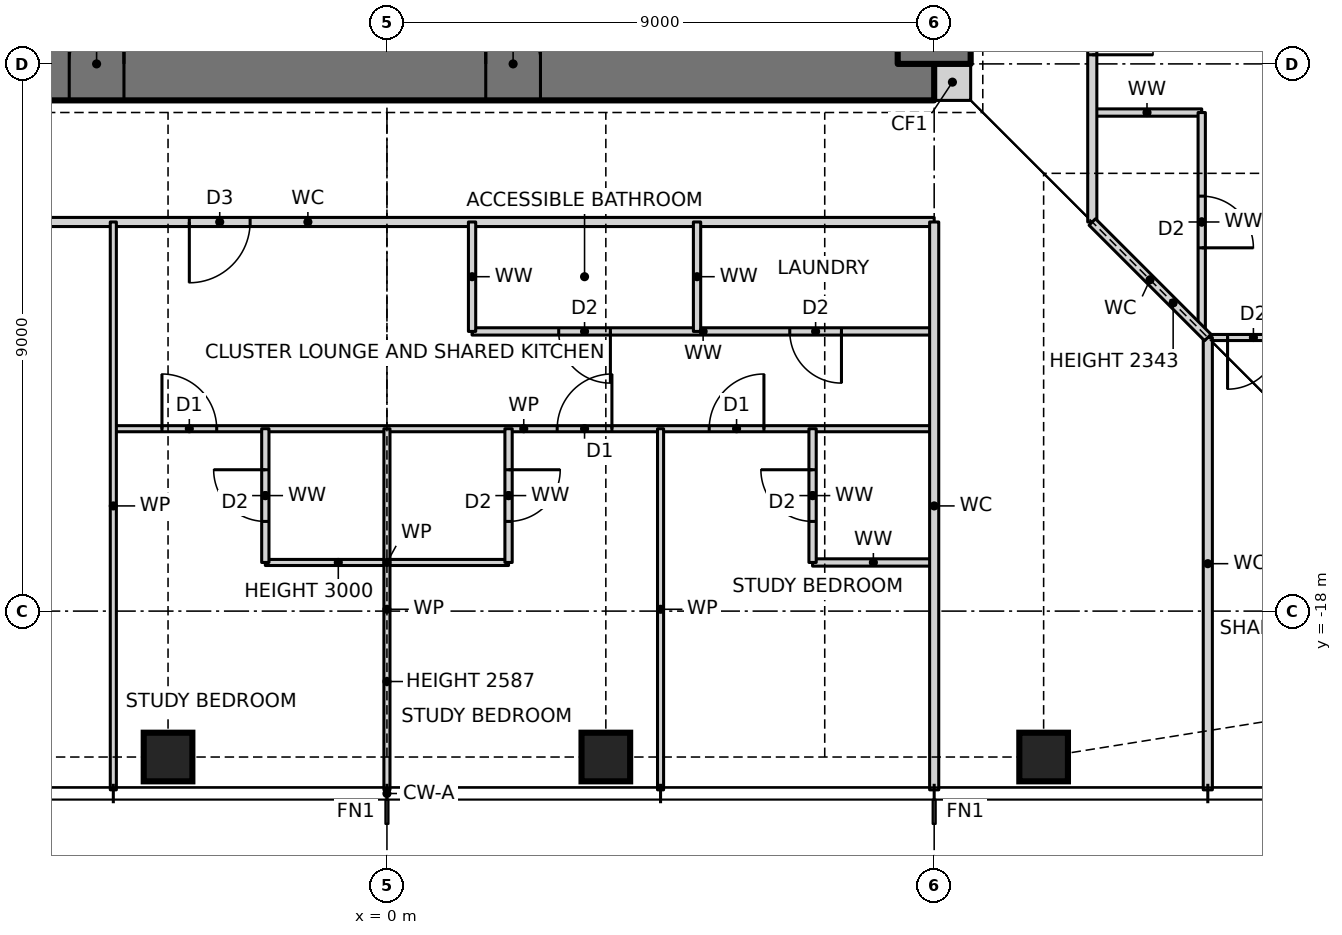
"""IFC4 building model, lengths in metres.
Left out: names, types, materials, properties, quantities, classifications, styles, units other than length and angle.
Written with IfcOpenShell. Run it as: python <this file> out.ifc"""

import sys

from ifc_helpers import new_model, si_unit, direction, frame, frame_2d, origin, origin_2d, place, context, subcontext, project, spatial, rectangle, hollow_rectangle, extrude, element, fill, save


model = new_model("IFC4")
c1 = context("Model", 3, precision=1e-05, world=origin(), true_north=direction((0.0, 1.0)))
c2 = subcontext(c1, "Body", "Model", "MODEL_VIEW")
j1 = project(units=[si_unit("LENGTHUNIT", "METRE"), si_unit("PLANEANGLEUNIT", "RADIAN")], contexts=[c1])
p1 = place(None, origin())
s1 = spatial("IfcSite", under=j1, at=p1, CompositionType="ELEMENT")
p2 = place(p1, origin())
s2 = spatial("IfcBuilding", under=s1, at=p2, CompositionType="ELEMENT")
p3 = place(p2, frame((0.0, 0.0, 136.5)))
s3 = spatial("IfcBuildingStorey", under=s2, at=p3, CompositionType="ELEMENT", Elevation=136.5)
for number, where, z_axis, x_axis in (
    (1, (-3.6, -20.4, 0.0), (0.0, 0.0, 1.0), (1.0, 0.0, 0.0)),
    (2, (3.6, -20.4, 0.0), (0.0, 0.0, 1.0), (1.0, 0.0, 0.0)),
    (3, (10.8, -20.4, 0.0), (0.0, 0.0, 1.0), (1.0, 0.0, 0.0)),
):
    element("IfcColumn", number, at=place(p3, frame(where, z_axis=z_axis, x_axis=x_axis)), inside=s3, PredefinedType="COLUMN", context=c2, shape_type="SweptSolid", body=[
        extrude(hollow_rectangle(XDim=0.8, YDim=0.8, WallThickness=0.07, at=origin_2d()), origin(), (0.0, 0.0, 1.0), 3.5),
    ])
p4 = place(p3, frame((9.0, -9.3, 0.0), z_axis=(0.0, 0.0, 1.0), x_axis=(1.0, 0.0, 0.0)))
e4 = element("IfcWall", 4, at=p4, inside=s3, PredefinedType="SOLIDWALL", context=c2, shape_type="SweptSolid", body=[
    extrude(rectangle(XDim=0.6, YDim=0.6, at=frame_2d((0.3, 0.0))), origin(), (0.0, 0.0, 1.0), 3.5),
])
p5 = place(p3, frame((-9.0, -9.0, 0.0), z_axis=(0.0, 0.0, 1.0), x_axis=(1.0, 0.0, 0.0)))
e5 = element("IfcWall", 5, at=p5, inside=s3, PredefinedType="SHEAR", context=c2, shape_type="SweptSolid", body=[
    extrude(rectangle(XDim=18.0, YDim=1.2, at=frame_2d((9.0, 0.0))), origin(), (0.0, 0.0, 1.0), 3.5),
])
p6 = place(p5, frame((3.775, 0.0, 0.0)))
e6 = element("IfcOpeningElement", 6, at=p6, cuts=e5, PredefinedType="OPENING", context=c2, shape_type="SweptSolid", body=[
    extrude(rectangle(XDim=0.9, YDim=2.1, at=frame_2d((0.45, 1.05))), frame((0.0, 0.61, 0.0), z_axis=(0.0, -1.0, 0.0), x_axis=(1.0, 0.0, 0.0)), (0.0, 0.0, 1.0), 1.22),
])
p7 = place(p5, frame((10.625, 0.0, 0.0)))
e7 = element("IfcOpeningElement", 7, at=p7, cuts=e5, PredefinedType="OPENING", context=c2, shape_type="SweptSolid", body=[
    extrude(rectangle(XDim=0.9, YDim=2.1, at=frame_2d((0.45, 1.05))), frame((0.0, 0.61, 0.0), z_axis=(0.0, -1.0, 0.0), x_axis=(1.0, 0.0, 0.0)), (0.0, 0.0, 1.0), 1.22),
])
p8 = place(p3, frame((9.0, -9.0, 0.0), z_axis=(0.0, 0.0, 1.0), x_axis=(0.0, 1.0, 0.0)))
e8 = element("IfcWall", 8, at=p8, inside=s3, PredefinedType="SHEAR", context=c2, shape_type="SweptSolid", body=[
    extrude(rectangle(XDim=18.0, YDim=1.2, at=frame_2d((9.0, 0.0))), origin(), (0.0, 0.0, 1.0), 3.5),
])
p9 = place(p8, frame((8.5, 0.0, 0.0)))
e9 = element("IfcOpeningElement", 9, at=p9, cuts=e8, PredefinedType="OPENING", context=c2, shape_type="SweptSolid", body=[
    extrude(rectangle(XDim=1.0, YDim=2.1, at=frame_2d((0.5, 1.05))), frame((0.0, 0.61, 0.0), z_axis=(0.0, -1.0, 0.0), x_axis=(1.0, 0.0, 0.0)), (0.0, 0.0, 1.0), 1.22),
])
p10 = place(p3, frame((-2.0, -17.2, 0.0), z_axis=(0.0, 0.0, 1.0), x_axis=(1.0, 0.0, 0.0)))
e10 = element("IfcWall", 10, at=p10, inside=s3, PredefinedType="PARTITIONING", context=c2, shape_type="SweptSolid", body=[
    extrude(rectangle(XDim=4.0, YDim=0.1, at=frame_2d((2.0, 0.0))), origin(), (0.0, 0.0, 1.0), 3.0),
])
p11 = place(p3, frame((7.0, -17.2, 0.0), z_axis=(0.0, 0.0, 1.0), x_axis=(1.0, 0.0, 0.0)))
e11 = element("IfcWall", 11, at=p11, inside=s3, PredefinedType="PARTITIONING", context=c2, shape_type="SweptSolid", body=[
    extrude(rectangle(XDim=2.0, YDim=0.12, at=frame_2d((1.0, 0.0))), origin(), (0.0, 0.0, 1.0), 3.27),
])
p12 = place(p3, frame((-4.5, -15.0, 0.0), z_axis=(0.0, 0.0, 1.0), x_axis=(1.0, 0.0, 0.0)))
e12 = element("IfcWall", 12, at=p12, inside=s3, PredefinedType="PARTITIONING", context=c2, shape_type="SweptSolid", body=[
    extrude(rectangle(XDim=13.5, YDim=0.1, at=frame_2d((6.75, 0.0))), origin(), (0.0, 0.0, 1.0), 3.27),
])
p13 = place(p12, frame((0.8, 0.0, 0.0)))
e13 = element("IfcOpeningElement", 13, at=p13, cuts=e12, PredefinedType="OPENING", context=c2, shape_type="SweptSolid", body=[
    extrude(rectangle(XDim=0.9, YDim=2.1, at=frame_2d((0.45, 1.05))), frame((0.0, 0.06, 0.0), z_axis=(0.0, -1.0, 0.0), x_axis=(1.0, 0.0, 0.0)), (0.0, 0.0, 1.0), 0.12),
])
p14 = place(p12, frame((7.3, 0.0, 0.0)))
e14 = element("IfcOpeningElement", 14, at=p14, cuts=e12, PredefinedType="OPENING", context=c2, shape_type="SweptSolid", body=[
    extrude(rectangle(XDim=0.9, YDim=2.1, at=frame_2d((0.45, 1.05))), frame((0.0, 0.06, 0.0), z_axis=(0.0, -1.0, 0.0), x_axis=(1.0, 0.0, 0.0)), (0.0, 0.0, 1.0), 0.12),
])
p15 = place(p12, frame((9.8, 0.0, 0.0)))
e15 = element("IfcOpeningElement", 15, at=p15, cuts=e12, PredefinedType="OPENING", context=c2, shape_type="SweptSolid", body=[
    extrude(rectangle(XDim=0.9, YDim=2.1, at=frame_2d((0.45, 1.05))), frame((0.0, 0.06, 0.0), z_axis=(0.0, -1.0, 0.0), x_axis=(1.0, 0.0, 0.0)), (0.0, 0.0, 1.0), 0.12),
])
p16 = place(p3, frame((13.5, -13.5, 0.0), z_axis=(0.0, 0.0, 1.0), x_axis=(1.0, 0.0, 0.0)))
e16 = element("IfcWall", 16, at=p16, inside=s3, PredefinedType="PARTITIONING", context=c2, shape_type="SweptSolid", body=[
    extrude(rectangle(XDim=7.44, YDim=0.1, at=frame_2d((3.72, 0.0))), origin(), (0.0, 0.0, 1.0), 3.27),
])
p17 = place(p16, frame((0.325, 0.0, 0.0)))
e17 = element("IfcOpeningElement", 17, at=p17, cuts=e16, PredefinedType="OPENING", context=c2, shape_type="SweptSolid", body=[
    extrude(rectangle(XDim=0.85, YDim=2.1, at=frame_2d((0.425, 1.05))), frame((0.0, 0.06, 0.0), z_axis=(0.0, -1.0, 0.0), x_axis=(1.0, 0.0, 0.0)), (0.0, 0.0, 1.0), 0.12),
])
p18 = place(p3, frame((1.4, -13.4, 0.0), z_axis=(0.0, 0.0, 1.0), x_axis=(1.0, 0.0, 0.0)))
e18 = element("IfcWall", 18, at=p18, inside=s3, PredefinedType="PARTITIONING", context=c2, shape_type="SweptSolid", body=[
    extrude(rectangle(XDim=7.6, YDim=0.12, at=frame_2d((3.8, 0.0))), origin(), (0.0, 0.0, 1.0), 3.27),
])
p19 = place(p18, frame((1.425, 0.0, 0.0)))
e19 = element("IfcOpeningElement", 19, at=p19, cuts=e18, PredefinedType="OPENING", context=c2, shape_type="SweptSolid", body=[
    extrude(rectangle(XDim=0.85, YDim=2.1, at=frame_2d((0.425, 1.05))), frame((0.0, 0.07, 0.0), z_axis=(0.0, -1.0, 0.0), x_axis=(1.0, 0.0, 0.0)), (0.0, 0.0, 1.0), 0.14),
])
p20 = place(p18, frame((5.225, 0.0, 0.0)))
e20 = element("IfcOpeningElement", 20, at=p20, cuts=e18, PredefinedType="OPENING", context=c2, shape_type="SweptSolid", body=[
    extrude(rectangle(XDim=0.85, YDim=2.1, at=frame_2d((0.425, 1.05))), frame((0.0, 0.07, 0.0), z_axis=(0.0, -1.0, 0.0), x_axis=(1.0, 0.0, 0.0)), (0.0, 0.0, 1.0), 0.14),
])
p21 = place(p3, frame((-11.6, -11.6, 0.0), z_axis=(0.0, 0.0, 1.0), x_axis=(1.0, 0.0, 0.0)))
e21 = element("IfcWall", 21, at=p21, inside=s3, PredefinedType="PARTITIONING", context=c2, shape_type="SweptSolid", body=[
    extrude(rectangle(XDim=20.6, YDim=0.15, at=frame_2d((10.3, 0.0))), origin(), (0.0, 0.0, 1.0), 3.27),
])
p22 = place(p21, frame((2.65, 0.0, 0.0)))
e22 = element("IfcOpeningElement", 22, at=p22, cuts=e21, PredefinedType="OPENING", context=c2, shape_type="SweptSolid", body=[
    extrude(rectangle(XDim=1.8, YDim=2.1, at=frame_2d((0.9, 1.05))), frame((0.0, 0.085, 0.0), z_axis=(0.0, -1.0, 0.0), x_axis=(1.0, 0.0, 0.0)), (0.0, 0.0, 1.0), 0.17),
])
p23 = place(p21, frame((8.35, 0.0, 0.0)))
e23 = element("IfcOpeningElement", 23, at=p23, cuts=e21, PredefinedType="OPENING", context=c2, shape_type="SweptSolid", body=[
    extrude(rectangle(XDim=1.0, YDim=2.1, at=frame_2d((0.5, 1.05))), frame((0.0, 0.085, 0.0), z_axis=(0.0, -1.0, 0.0), x_axis=(1.0, 0.0, 0.0)), (0.0, 0.0, 1.0), 0.17),
])
p24 = place(p3, frame((11.6, -9.8, 0.0), z_axis=(0.0, 0.0, 1.0), x_axis=(1.0, 0.0, 0.0)))
e24 = element("IfcWall", 24, at=p24, inside=s3, PredefinedType="PARTITIONING", context=c2, shape_type="SweptSolid", body=[
    extrude(rectangle(XDim=1.8, YDim=0.12, at=frame_2d((0.9, 0.0))), origin(), (0.0, 0.0, 1.0), 3.27),
])
p25 = place(p3, frame((13.5, -20.94, 0.0), z_axis=(0.0, 0.0, 1.0), x_axis=(0.0, 1.0, 0.0)))
e25 = element("IfcWall", 25, at=p25, inside=s3, PredefinedType="PARTITIONING", context=c2, shape_type="SweptSolid", body=[
    extrude(rectangle(XDim=7.44, YDim=0.15, at=frame_2d((3.72, 0.0))), origin(), (0.0, 0.0, 1.0), 3.27),
])
p26 = place(p3, frame((13.4, -13.4, 0.0), z_axis=(0.0, 0.0, 1.0), x_axis=(0.0, 1.0, 0.0)))
e26 = element("IfcWall", 26, at=p26, inside=s3, PredefinedType="PARTITIONING", context=c2, shape_type="SweptSolid", body=[
    extrude(rectangle(XDim=3.6, YDim=0.12, at=frame_2d((1.8, 0.0))), origin(), (0.0, 0.0, 1.0), 3.27),
])
p27 = place(p26, frame((1.375, 0.0, 0.0)))
e27 = element("IfcOpeningElement", 27, at=p27, cuts=e26, PredefinedType="OPENING", context=c2, shape_type="SweptSolid", body=[
    extrude(rectangle(XDim=0.85, YDim=2.1, at=frame_2d((0.425, 1.05))), frame((0.0, 0.07, 0.0), z_axis=(0.0, -1.0, 0.0), x_axis=(1.0, 0.0, 0.0)), (0.0, 0.0, 1.0), 0.14),
])
p28 = place(p3, frame((11.6, -11.6, 0.0), z_axis=(0.0, 0.0, 1.0), x_axis=(0.0, 1.0, 0.0)))
e28 = element("IfcWall", 28, at=p28, inside=s3, PredefinedType="PARTITIONING", context=c2, shape_type="SweptSolid", body=[
    extrude(rectangle(XDim=20.6, YDim=0.15, at=frame_2d((10.3, 0.0))), origin(), (0.0, 0.0, 1.0), 3.27),
])
p29 = place(p28, frame((2.75, 0.0, 0.0)))
e29 = element("IfcOpeningElement", 29, at=p29, cuts=e28, PredefinedType="OPENING", context=c2, shape_type="SweptSolid", body=[
    extrude(rectangle(XDim=1.0, YDim=2.1, at=frame_2d((0.5, 1.05))), frame((0.0, 0.085, 0.0), z_axis=(0.0, -1.0, 0.0), x_axis=(1.0, 0.0, 0.0)), (0.0, 0.0, 1.0), 0.17),
])
p30 = place(p28, frame((8.35, 0.0, 0.0)))
e30 = element("IfcOpeningElement", 30, at=p30, cuts=e28, PredefinedType="OPENING", context=c2, shape_type="SweptSolid", body=[
    extrude(rectangle(XDim=1.0, YDim=2.1, at=frame_2d((0.5, 1.05))), frame((0.0, 0.085, 0.0), z_axis=(0.0, -1.0, 0.0), x_axis=(1.0, 0.0, 0.0)), (0.0, 0.0, 1.0), 0.17),
])
p31 = place(p3, frame((9.0, -20.94, 0.0), z_axis=(0.0, 0.0, 1.0), x_axis=(0.0, 1.0, 0.0)))
e31 = element("IfcWall", 31, at=p31, inside=s3, PredefinedType="PARTITIONING", context=c2, shape_type="SweptSolid", body=[
    extrude(rectangle(XDim=9.34, YDim=0.15, at=frame_2d((4.67, 0.0))), origin(), (0.0, 0.0, 1.0), 3.27),
])
p32 = place(p3, frame((7.0, -17.2, 0.0), z_axis=(0.0, 0.0, 1.0), x_axis=(0.0, 1.0, 0.0)))
e32 = element("IfcWall", 32, at=p32, inside=s3, PredefinedType="PARTITIONING", context=c2, shape_type="SweptSolid", body=[
    extrude(rectangle(XDim=2.2, YDim=0.12, at=frame_2d((1.1, 0.0))), origin(), (0.0, 0.0, 1.0), 3.27),
])
p33 = place(p32, frame((0.675, 0.0, 0.0)))
e33 = element("IfcOpeningElement", 33, at=p33, cuts=e32, PredefinedType="OPENING", context=c2, shape_type="SweptSolid", body=[
    extrude(rectangle(XDim=0.85, YDim=2.1, at=frame_2d((0.425, 1.05))), frame((0.0, 0.07, 0.0), z_axis=(0.0, -1.0, 0.0), x_axis=(1.0, 0.0, 0.0)), (0.0, 0.0, 1.0), 0.14),
])
p34 = place(p3, frame((5.1, -13.4, 0.0), z_axis=(0.0, 0.0, 1.0), x_axis=(0.0, 1.0, 0.0)))
e34 = element("IfcWall", 34, at=p34, inside=s3, PredefinedType="PARTITIONING", context=c2, shape_type="SweptSolid", body=[
    extrude(rectangle(XDim=1.8, YDim=0.12, at=frame_2d((0.9, 0.0))), origin(), (0.0, 0.0, 1.0), 3.27),
])
p35 = place(p3, frame((4.5, -20.94, 0.0), z_axis=(0.0, 0.0, 1.0), x_axis=(0.0, 1.0, 0.0)))
e35 = element("IfcWall", 35, at=p35, inside=s3, PredefinedType="PARTITIONING", context=c2, shape_type="SweptSolid", body=[
    extrude(rectangle(XDim=5.94, YDim=0.1, at=frame_2d((2.97, 0.0))), origin(), (0.0, 0.0, 1.0), 3.27),
])
p36 = place(p3, frame((2.0, -17.2, 0.0), z_axis=(0.0, 0.0, 1.0), x_axis=(0.0, 1.0, 0.0)))
e36 = element("IfcWall", 36, at=p36, inside=s3, PredefinedType="PARTITIONING", context=c2, shape_type="SweptSolid", body=[
    extrude(rectangle(XDim=2.2, YDim=0.12, at=frame_2d((1.1, 0.0))), origin(), (0.0, 0.0, 1.0), 3.27),
])
p37 = place(p36, frame((0.675, 0.0, 0.0)))
e37 = element("IfcOpeningElement", 37, at=p37, cuts=e36, PredefinedType="OPENING", context=c2, shape_type="SweptSolid", body=[
    extrude(rectangle(XDim=0.85, YDim=2.1, at=frame_2d((0.425, 1.05))), frame((0.0, 0.07, 0.0), z_axis=(0.0, -1.0, 0.0), x_axis=(1.0, 0.0, 0.0)), (0.0, 0.0, 1.0), 0.14),
])
p38 = place(p3, frame((1.4, -13.4, 0.0), z_axis=(0.0, 0.0, 1.0), x_axis=(0.0, 1.0, 0.0)))
e38 = element("IfcWall", 38, at=p38, inside=s3, PredefinedType="PARTITIONING", context=c2, shape_type="SweptSolid", body=[
    extrude(rectangle(XDim=1.8, YDim=0.12, at=frame_2d((0.9, 0.0))), origin(), (0.0, 0.0, 1.0), 3.27),
])
p39 = place(p3, frame((0.0, -20.94, 0.0), z_axis=(0.0, 0.0, 1.0), x_axis=(0.0, 1.0, 0.0)))
e39 = element("IfcWall", 39, at=p39, inside=s3, PredefinedType="PARTITIONING", context=c2, shape_type="SweptSolid", body=[
    extrude(rectangle(XDim=5.94, YDim=0.1, at=frame_2d((2.97, 0.0))), origin(), (0.0, 0.0, 1.0), 2.587),
])
p40 = place(p3, frame((-2.0, -17.2, 0.0), z_axis=(0.0, 0.0, 1.0), x_axis=(0.0, 1.0, 0.0)))
e40 = element("IfcWall", 40, at=p40, inside=s3, PredefinedType="PARTITIONING", context=c2, shape_type="SweptSolid", body=[
    extrude(rectangle(XDim=2.2, YDim=0.12, at=frame_2d((1.1, 0.0))), origin(), (0.0, 0.0, 1.0), 3.27),
])
p41 = place(p40, frame((0.675, 0.0, 0.0)))
e41 = element("IfcOpeningElement", 41, at=p41, cuts=e40, PredefinedType="OPENING", context=c2, shape_type="SweptSolid", body=[
    extrude(rectangle(XDim=0.85, YDim=2.1, at=frame_2d((0.425, 1.05))), frame((0.0, 0.07, 0.0), z_axis=(0.0, -1.0, 0.0), x_axis=(1.0, 0.0, 0.0)), (0.0, 0.0, 1.0), 0.14),
])
p42 = place(p3, frame((-4.5, -20.94, 0.0), z_axis=(0.0, 0.0, 1.0), x_axis=(0.0, 1.0, 0.0)))
e42 = element("IfcWall", 42, at=p42, inside=s3, PredefinedType="PARTITIONING", context=c2, shape_type="SweptSolid", body=[
    extrude(rectangle(XDim=9.34, YDim=0.1, at=frame_2d((4.67, 0.0))), origin(), (0.0, 0.0, 1.0), 3.27),
])
p43 = place(p3, frame((13.5, -13.5, 0.0), z_axis=(0.0, 0.0, 1.0), x_axis=(-0.707106781187, 0.707106781187, 0.0)))
e43 = element("IfcWall", 43, at=p43, inside=s3, PredefinedType="PARTITIONING", context=c2, shape_type="SweptSolid", body=[
    extrude(rectangle(XDim=2.687, YDim=0.15, at=frame_2d((1.343, 0.0))), origin(), (0.0, 0.0, 1.0), 2.343),
])
p44 = place(p41, origin())
e44 = element("IfcDoor", 44, at=p44, inside=s3, OperationType="SINGLE_SWING_RIGHT", PredefinedType="DOOR", context=c2, shape_type="SweptSolid", body=[
    extrude(rectangle(XDim=0.85, YDim=2.1, at=frame_2d((0.425, 1.05))), frame((0.0, 0.025, 0.0), z_axis=(0.0, -1.0, 0.0), x_axis=(1.0, 0.0, 0.0)), (0.0, 0.0, 1.0), 0.05),
])
fill(e41, e44)
p45 = place(p13, origin())
e45 = element("IfcDoor", 45, at=p45, inside=s3, OperationType="SINGLE_SWING_LEFT", PredefinedType="DOOR", context=c2, shape_type="SweptSolid", body=[
    extrude(rectangle(XDim=0.9, YDim=2.1, at=frame_2d((0.45, 1.05))), frame((0.0, 0.025, 0.0), z_axis=(0.0, -1.0, 0.0), x_axis=(1.0, 0.0, 0.0)), (0.0, 0.0, 1.0), 0.05),
])
fill(e13, e45)
p46 = place(p37, frame((0.85, 0.0, 0.0), z_axis=(0.0, 0.0, 1.0), x_axis=(-1.0, 0.0, 0.0)))
e46 = element("IfcDoor", 46, at=p46, inside=s3, OperationType="SINGLE_SWING_LEFT", PredefinedType="DOOR", context=c2, shape_type="SweptSolid", body=[
    extrude(rectangle(XDim=0.85, YDim=2.1, at=frame_2d((0.425, 1.05))), frame((0.0, 0.025, 0.0), z_axis=(0.0, -1.0, 0.0), x_axis=(1.0, 0.0, 0.0)), (0.0, 0.0, 1.0), 0.05),
])
fill(e37, e46)
p47 = place(p14, origin())
e47 = element("IfcDoor", 47, at=p47, inside=s3, OperationType="SINGLE_SWING_RIGHT", PredefinedType="DOOR", context=c2, shape_type="SweptSolid", body=[
    extrude(rectangle(XDim=0.9, YDim=2.1, at=frame_2d((0.45, 1.05))), frame((0.0, 0.025, 0.0), z_axis=(0.0, -1.0, 0.0), x_axis=(1.0, 0.0, 0.0)), (0.0, 0.0, 1.0), 0.05),
])
fill(e14, e47)
p48 = place(p33, origin())
e48 = element("IfcDoor", 48, at=p48, inside=s3, OperationType="SINGLE_SWING_RIGHT", PredefinedType="DOOR", context=c2, shape_type="SweptSolid", body=[
    extrude(rectangle(XDim=0.85, YDim=2.1, at=frame_2d((0.425, 1.05))), frame((0.0, 0.025, 0.0), z_axis=(0.0, -1.0, 0.0), x_axis=(1.0, 0.0, 0.0)), (0.0, 0.0, 1.0), 0.05),
])
fill(e33, e48)
p49 = place(p15, origin())
e49 = element("IfcDoor", 49, at=p49, inside=s3, OperationType="SINGLE_SWING_RIGHT", PredefinedType="DOOR", context=c2, shape_type="SweptSolid", body=[
    extrude(rectangle(XDim=0.9, YDim=2.1, at=frame_2d((0.45, 1.05))), frame((0.0, 0.025, 0.0), z_axis=(0.0, -1.0, 0.0), x_axis=(1.0, 0.0, 0.0)), (0.0, 0.0, 1.0), 0.05),
])
fill(e15, e49)
p50 = place(p23, frame((1.0, 0.0, 0.0), z_axis=(0.0, 0.0, 1.0), x_axis=(-1.0, 0.0, 0.0)))
e50 = element("IfcDoor", 50, at=p50, inside=s3, OperationType="SINGLE_SWING_RIGHT", PredefinedType="DOOR", context=c2, shape_type="SweptSolid", body=[
    extrude(rectangle(XDim=1.0, YDim=2.1, at=frame_2d((0.5, 1.05))), frame((0.0, 0.025, 0.0), z_axis=(0.0, -1.0, 0.0), x_axis=(1.0, 0.0, 0.0)), (0.0, 0.0, 1.0), 0.05),
])
fill(e23, e50)
p51 = place(p19, frame((0.85, 0.0, 0.0), z_axis=(0.0, 0.0, 1.0), x_axis=(-1.0, 0.0, 0.0)))
e51 = element("IfcDoor", 51, at=p51, inside=s3, OperationType="SINGLE_SWING_LEFT", PredefinedType="DOOR", context=c2, shape_type="SweptSolid", body=[
    extrude(rectangle(XDim=0.85, YDim=2.1, at=frame_2d((0.425, 1.05))), frame((0.0, 0.025, 0.0), z_axis=(0.0, -1.0, 0.0), x_axis=(1.0, 0.0, 0.0)), (0.0, 0.0, 1.0), 0.05),
])
fill(e19, e51)
p52 = place(p20, frame((0.85, 0.0, 0.0), z_axis=(0.0, 0.0, 1.0), x_axis=(-1.0, 0.0, 0.0)))
e52 = element("IfcDoor", 52, at=p52, inside=s3, OperationType="SINGLE_SWING_LEFT", PredefinedType="DOOR", context=c2, shape_type="SweptSolid", body=[
    extrude(rectangle(XDim=0.85, YDim=2.1, at=frame_2d((0.425, 1.05))), frame((0.0, 0.025, 0.0), z_axis=(0.0, -1.0, 0.0), x_axis=(1.0, 0.0, 0.0)), (0.0, 0.0, 1.0), 0.05),
])
fill(e20, e52)
p53 = place(p29, frame((1.0, 0.0, 0.0), z_axis=(0.0, 0.0, 1.0), x_axis=(-1.0, 0.0, 0.0)))
e53 = element("IfcDoor", 53, at=p53, inside=s3, OperationType="SINGLE_SWING_RIGHT", PredefinedType="DOOR", context=c2, shape_type="SweptSolid", body=[
    extrude(rectangle(XDim=1.0, YDim=2.1, at=frame_2d((0.5, 1.05))), frame((0.0, 0.025, 0.0), z_axis=(0.0, -1.0, 0.0), x_axis=(1.0, 0.0, 0.0)), (0.0, 0.0, 1.0), 0.05),
])
fill(e29, e53)
p54 = place(p27, frame((0.85, 0.0, 0.0), z_axis=(0.0, 0.0, 1.0), x_axis=(-1.0, 0.0, 0.0)))
e54 = element("IfcDoor", 54, at=p54, inside=s3, OperationType="SINGLE_SWING_RIGHT", PredefinedType="DOOR", context=c2, shape_type="SweptSolid", body=[
    extrude(rectangle(XDim=0.85, YDim=2.1, at=frame_2d((0.425, 1.05))), frame((0.0, 0.025, 0.0), z_axis=(0.0, -1.0, 0.0), x_axis=(1.0, 0.0, 0.0)), (0.0, 0.0, 1.0), 0.05),
])
fill(e27, e54)
p55 = place(p17, frame((0.85, 0.0, 0.0), z_axis=(0.0, 0.0, 1.0), x_axis=(-1.0, 0.0, 0.0)))
e55 = element("IfcDoor", 55, at=p55, inside=s3, OperationType="SINGLE_SWING_RIGHT", PredefinedType="DOOR", context=c2, shape_type="SweptSolid", body=[
    extrude(rectangle(XDim=0.85, YDim=2.1, at=frame_2d((0.425, 1.05))), frame((0.0, 0.025, 0.0), z_axis=(0.0, -1.0, 0.0), x_axis=(1.0, 0.0, 0.0)), (0.0, 0.0, 1.0), 0.05),
])
fill(e17, e55)
p56 = place(p6, origin())
e56 = element("IfcDoor", 56, at=p56, inside=s3, OperationType="SINGLE_SWING_RIGHT", PredefinedType="DOOR", context=c2, shape_type="SweptSolid", body=[
    extrude(rectangle(XDim=0.9, YDim=2.1, at=frame_2d((0.45, 1.05))), frame((0.0, 0.025, 0.0), z_axis=(0.0, -1.0, 0.0), x_axis=(1.0, 0.0, 0.0)), (0.0, 0.0, 1.0), 0.05),
])
fill(e6, e56)
p57 = place(p7, origin())
e57 = element("IfcDoor", 57, at=p57, inside=s3, OperationType="SINGLE_SWING_LEFT", PredefinedType="DOOR", context=c2, shape_type="SweptSolid", body=[
    extrude(rectangle(XDim=0.9, YDim=2.1, at=frame_2d((0.45, 1.05))), frame((0.0, 0.025, 0.0), z_axis=(0.0, -1.0, 0.0), x_axis=(1.0, 0.0, 0.0)), (0.0, 0.0, 1.0), 0.05),
])
fill(e7, e57)
save(model, sys.argv[1])
